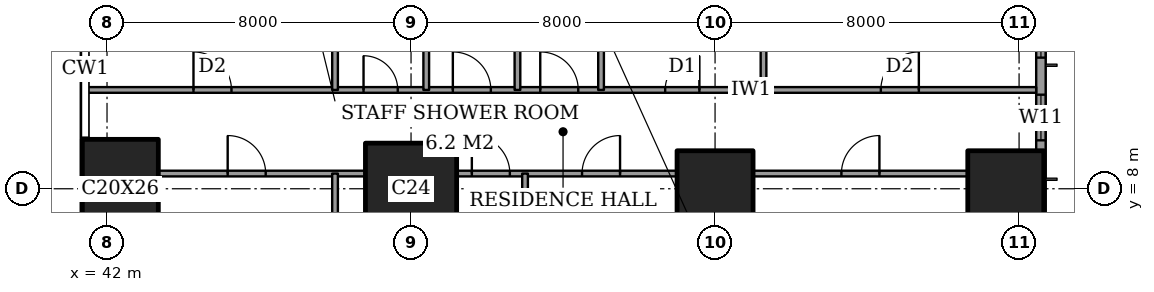
"""IFC4 building model, lengths in metres.
Left out: names, types, materials, properties, quantities, classifications, styles, units other than length and angle.
Written with IfcOpenShell. Run it as: python <this file> out.ifc"""

import sys

from ifc_helpers import new_model, si_unit, direction, frame, frame_2d, origin, origin_2d, place, context, subcontext, project, spatial, rectangle, extrude, element, fill, save


model = new_model("IFC4")
c1 = context("Model", 3, precision=1e-05, world=origin(), true_north=direction((0.0, 1.0)))
c2 = subcontext(c1, "Body", "Model", "MODEL_VIEW")
j1 = project(units=[si_unit("LENGTHUNIT", "METRE"), si_unit("PLANEANGLEUNIT", "RADIAN")], contexts=[c1])
p1 = place(None, origin())
s1 = spatial("IfcSite", under=j1, at=p1, CompositionType="ELEMENT")
p2 = place(p1, origin())
s2 = spatial("IfcBuilding", under=s1, at=p2, CompositionType="ELEMENT")
p3 = place(p2, frame((0.0, 0.0, 146.6)))
s3 = spatial("IfcBuildingStorey", under=s2, at=p3, CompositionType="ELEMENT", Elevation=146.6)
p4 = place(p3, frame((42.35, 8.0, 0.0), z_axis=(0.0, 0.0, 1.0), x_axis=(1.0, 0.0, 0.0)))
e1 = element("IfcColumn", 1, at=p4, inside=s3, PredefinedType="COLUMN", context=c2, shape_type="SweptSolid", body=[
    extrude(rectangle(XDim=2.0, YDim=2.6, at=origin_2d()), origin(), (0.0, 0.0, 1.0), 3.6),
])
p5 = place(p3, frame((50.0, 8.0, 0.0), z_axis=(0.0, 0.0, 1.0), x_axis=(1.0, 0.0, 0.0)))
e2 = element("IfcColumn", 2, at=p5, inside=s3, PredefinedType="COLUMN", context=c2, shape_type="SweptSolid", body=[
    extrude(rectangle(XDim=2.4, YDim=2.4, at=origin_2d()), origin(), (0.0, 0.0, 1.0), 3.6),
])
for number, where, z_axis, x_axis in (
    (3, (58.0, 8.0, 0.0), (0.0, 0.0, 1.0), (1.0, 0.0, 0.0)),
    (4, (65.65, 8.0, 0.0), (0.0, 0.0, 1.0), (1.0, 0.0, 0.0)),
):
    element("IfcColumn", number, at=place(p3, frame(where, z_axis=z_axis, x_axis=x_axis)), inside=s3, PredefinedType="COLUMN", context=c2, shape_type="SweptSolid", body=[
        extrude(rectangle(XDim=2.0, YDim=2.0, at=origin_2d()), origin(), (0.0, 0.0, 1.0), 3.6),
    ])
p6 = place(p3, frame((66.575, 3.175, 0.0), z_axis=(0.0, 0.0, 1.0), x_axis=(0.0, 1.0, 0.0)))
e5 = element("IfcWall", 5, at=p6, inside=s3, PredefinedType="SOLIDWALL", context=c2, shape_type="SweptSolid", body=[
    extrude(rectangle(XDim=41.65, YDim=0.25, at=frame_2d((20.825, 0.0))), origin(), (0.0, 0.0, 1.0), 3.6),
])
p7 = place(p6, frame((0.775, 0.0, 0.4)))
e6 = element("IfcOpeningElement", 6, at=p7, cuts=e5, PredefinedType="OPENING", context=c2, shape_type="SweptSolid", body=[
    extrude(rectangle(XDim=2.4, YDim=2.2, at=frame_2d((1.2, 1.1))), frame((0.0, 0.135, 0.0), z_axis=(0.0, -1.0, 0.0), x_axis=(1.0, 0.0, 0.0)), (0.0, 0.0, 1.0), 0.27),
])
p8 = place(p6, frame((6.1, 0.0, 0.4)))
e7 = element("IfcOpeningElement", 7, at=p8, cuts=e5, PredefinedType="OPENING", context=c2, shape_type="SweptSolid", body=[
    extrude(rectangle(XDim=1.2, YDim=2.2, at=frame_2d((0.6, 1.1))), frame((0.0, 0.135, 0.0), z_axis=(0.0, -1.0, 0.0), x_axis=(1.0, 0.0, 0.0)), (0.0, 0.0, 1.0), 0.27),
])
p9 = place(p6, frame((8.275, 0.0, 0.4)))
e8 = element("IfcOpeningElement", 8, at=p9, cuts=e5, PredefinedType="OPENING", context=c2, shape_type="SweptSolid", body=[
    extrude(rectangle(XDim=2.4, YDim=2.2, at=frame_2d((1.2, 1.1))), frame((0.0, 0.135, 0.0), z_axis=(0.0, -1.0, 0.0), x_axis=(1.0, 0.0, 0.0)), (0.0, 0.0, 1.0), 0.27),
])
p10 = place(p6, frame((15.775, 0.0, 0.4)))
e9 = element("IfcOpeningElement", 9, at=p10, cuts=e5, PredefinedType="OPENING", context=c2, shape_type="SweptSolid", body=[
    extrude(rectangle(XDim=2.4, YDim=2.2, at=frame_2d((1.2, 1.1))), frame((0.0, 0.135, 0.0), z_axis=(0.0, -1.0, 0.0), x_axis=(1.0, 0.0, 0.0)), (0.0, 0.0, 1.0), 0.27),
])
p11 = place(p6, frame((23.475, 0.0, 0.4)))
e10 = element("IfcOpeningElement", 10, at=p11, cuts=e5, PredefinedType="OPENING", context=c2, shape_type="SweptSolid", body=[
    extrude(rectangle(XDim=2.4, YDim=2.2, at=frame_2d((1.2, 1.1))), frame((0.0, 0.135, 0.0), z_axis=(0.0, -1.0, 0.0), x_axis=(1.0, 0.0, 0.0)), (0.0, 0.0, 1.0), 0.27),
])
p12 = place(p6, frame((30.875, 0.0, 0.4)))
e11 = element("IfcOpeningElement", 11, at=p12, cuts=e5, PredefinedType="OPENING", context=c2, shape_type="SweptSolid", body=[
    extrude(rectangle(XDim=2.4, YDim=2.2, at=frame_2d((1.2, 1.1))), frame((0.0, 0.135, 0.0), z_axis=(0.0, -1.0, 0.0), x_axis=(1.0, 0.0, 0.0)), (0.0, 0.0, 1.0), 0.27),
])
p13 = place(p6, frame((34.325, 0.0, 0.4)))
e12 = element("IfcOpeningElement", 12, at=p13, cuts=e5, PredefinedType="OPENING", context=c2, shape_type="SweptSolid", body=[
    extrude(rectangle(XDim=1.2, YDim=2.2, at=frame_2d((0.6, 1.1))), frame((0.0, 0.135, 0.0), z_axis=(0.0, -1.0, 0.0), x_axis=(1.0, 0.0, 0.0)), (0.0, 0.0, 1.0), 0.27),
])
p14 = place(p6, frame((38.475, 0.0, 0.4)))
e13 = element("IfcOpeningElement", 13, at=p14, cuts=e5, PredefinedType="OPENING", context=c2, shape_type="SweptSolid", body=[
    extrude(rectangle(XDim=2.4, YDim=2.2, at=frame_2d((1.2, 1.1))), frame((0.0, 0.135, 0.0), z_axis=(0.0, -1.0, 0.0), x_axis=(1.0, 0.0, 0.0)), (0.0, 0.0, 1.0), 0.27),
])
p15 = place(p3, frame((43.35, 8.4, 0.0), z_axis=(0.0, 0.0, 1.0), x_axis=(1.0, 0.0, 0.0)))
e14 = element("IfcWall", 14, at=p15, inside=s3, PredefinedType="PARTITIONING", context=c2, shape_type="SweptSolid", body=[
    extrude(rectangle(XDim=5.45, YDim=0.15, at=frame_2d((2.725, 0.0))), origin(), (0.0, 0.0, 1.0), 3.35),
])
p16 = place(p15, frame((1.825, 0.0, 0.0)))
e15 = element("IfcOpeningElement", 15, at=p16, cuts=e14, PredefinedType="OPENING", context=c2, shape_type="SweptSolid", body=[
    extrude(rectangle(XDim=1.0, YDim=2.1, at=frame_2d((0.5, 1.05))), frame((0.0, 0.085, 0.0), z_axis=(0.0, -1.0, 0.0), x_axis=(1.0, 0.0, 0.0)), (0.0, 0.0, 1.0), 0.17),
])
p17 = place(p3, frame((51.2, 8.4, 0.0), z_axis=(0.0, 0.0, 1.0), x_axis=(1.0, 0.0, 0.0)))
e16 = element("IfcWall", 16, at=p17, inside=s3, PredefinedType="PARTITIONING", context=c2, shape_type="SweptSolid", body=[
    extrude(rectangle(XDim=5.8, YDim=0.15, at=frame_2d((2.9, 0.0))), origin(), (0.0, 0.0, 1.0), 3.35),
])
p18 = place(p17, frame((3.3, 0.0, 0.0)))
e17 = element("IfcOpeningElement", 17, at=p18, cuts=e16, PredefinedType="OPENING", context=c2, shape_type="SweptSolid", body=[
    extrude(rectangle(XDim=1.0, YDim=2.1, at=frame_2d((0.5, 1.05))), frame((0.0, 0.085, 0.0), z_axis=(0.0, -1.0, 0.0), x_axis=(1.0, 0.0, 0.0)), (0.0, 0.0, 1.0), 0.17),
])
p19 = place(p17, frame((0.4, 0.0, 0.0)))
e18 = element("IfcOpeningElement", 18, at=p19, cuts=e16, PredefinedType="OPENING", context=c2, shape_type="SweptSolid", body=[
    extrude(rectangle(XDim=1.0, YDim=2.1, at=frame_2d((0.5, 1.05))), frame((0.0, 0.085, 0.0), z_axis=(0.0, -1.0, 0.0), x_axis=(1.0, 0.0, 0.0)), (0.0, 0.0, 1.0), 0.17),
])
p20 = place(p3, frame((59.0, 8.4, 0.0), z_axis=(0.0, 0.0, 1.0), x_axis=(1.0, 0.0, 0.0)))
e19 = element("IfcWall", 19, at=p20, inside=s3, PredefinedType="PARTITIONING", context=c2, shape_type="SweptSolid", body=[
    extrude(rectangle(XDim=5.65, YDim=0.15, at=frame_2d((2.825, 0.0))), origin(), (0.0, 0.0, 1.0), 3.35),
])
p21 = place(p20, frame((2.325, 0.0, 0.0)))
e20 = element("IfcOpeningElement", 20, at=p21, cuts=e19, PredefinedType="OPENING", context=c2, shape_type="SweptSolid", body=[
    extrude(rectangle(XDim=1.0, YDim=2.1, at=frame_2d((0.5, 1.05))), frame((0.0, 0.085, 0.0), z_axis=(0.0, -1.0, 0.0), x_axis=(1.0, 0.0, 0.0)), (0.0, 0.0, 1.0), 0.17),
])
p22 = place(p3, frame((41.439, 10.6, 0.0), z_axis=(0.0, 0.0, 1.0), x_axis=(1.0, 0.0, 0.0)))
e21 = element("IfcWall", 21, at=p22, inside=s3, PredefinedType="PARTITIONING", context=c2, shape_type="SweptSolid", body=[
    extrude(rectangle(XDim=25.011, YDim=0.15, at=frame_2d((12.505, 0.0))), origin(), (0.0, 0.0, 1.0), 3.35),
])
p23 = place(p22, frame((11.961, 0.0, 0.0)))
e22 = element("IfcOpeningElement", 22, at=p23, cuts=e21, PredefinedType="OPENING", context=c2, shape_type="SweptSolid", body=[
    extrude(rectangle(XDim=1.0, YDim=2.1, at=frame_2d((0.5, 1.05))), frame((0.0, 0.085, 0.0), z_axis=(0.0, -1.0, 0.0), x_axis=(1.0, 0.0, 0.0)), (0.0, 0.0, 1.0), 0.17),
])
p24 = place(p22, frame((20.924, 0.0, 0.0)))
e23 = element("IfcOpeningElement", 23, at=p24, cuts=e21, PredefinedType="OPENING", context=c2, shape_type="SweptSolid", body=[
    extrude(rectangle(XDim=1.0, YDim=2.1, at=frame_2d((0.5, 1.05))), frame((0.0, 0.085, 0.0), z_axis=(0.0, -1.0, 0.0), x_axis=(1.0, 0.0, 0.0)), (0.0, 0.0, 1.0), 0.17),
])
p25 = place(p22, frame((15.249, 0.0, 0.0)))
e24 = element("IfcOpeningElement", 24, at=p25, cuts=e21, PredefinedType="OPENING", context=c2, shape_type="SweptSolid", body=[
    extrude(rectangle(XDim=0.9, YDim=2.1, at=frame_2d((0.45, 1.05))), frame((0.0, 0.085, 0.0), z_axis=(0.0, -1.0, 0.0), x_axis=(1.0, 0.0, 0.0)), (0.0, 0.0, 1.0), 0.17),
])
p26 = place(p22, frame((9.661, 0.0, 0.0)))
e25 = element("IfcOpeningElement", 25, at=p26, cuts=e21, PredefinedType="OPENING", context=c2, shape_type="SweptSolid", body=[
    extrude(rectangle(XDim=1.0, YDim=2.1, at=frame_2d((0.5, 1.05))), frame((0.0, 0.085, 0.0), z_axis=(0.0, -1.0, 0.0), x_axis=(1.0, 0.0, 0.0)), (0.0, 0.0, 1.0), 0.17),
])
p27 = place(p22, frame((7.311, 0.0, 0.0)))
e26 = element("IfcOpeningElement", 26, at=p27, cuts=e21, PredefinedType="OPENING", context=c2, shape_type="SweptSolid", body=[
    extrude(rectangle(XDim=0.9, YDim=2.1, at=frame_2d((0.45, 1.05))), frame((0.0, 0.085, 0.0), z_axis=(0.0, -1.0, 0.0), x_axis=(1.0, 0.0, 0.0)), (0.0, 0.0, 1.0), 0.17),
])
p28 = place(p22, frame((2.836, 0.0, 0.0)))
e27 = element("IfcOpeningElement", 27, at=p28, cuts=e21, PredefinedType="OPENING", context=c2, shape_type="SweptSolid", body=[
    extrude(rectangle(XDim=1.0, YDim=2.1, at=frame_2d((0.5, 1.05))), frame((0.0, 0.085, 0.0), z_axis=(0.0, -1.0, 0.0), x_axis=(1.0, 0.0, 0.0)), (0.0, 0.0, 1.0), 0.17),
])
p29 = place(p3, frame((48.0, -0.45, 0.0), z_axis=(0.0, 0.0, 1.0), x_axis=(0.0, 1.0, 0.0)))
e28 = element("IfcWall", 28, at=p29, inside=s3, PredefinedType="PARTITIONING", context=c2, shape_type="SweptSolid", body=[
    extrude(rectangle(XDim=8.85, YDim=0.15, at=frame_2d((4.425, 0.0))), origin(), (0.0, 0.0, 1.0), 3.35),
])
p30 = place(p3, frame((48.0, 10.6, 0.0), z_axis=(0.0, 0.0, 1.0), x_axis=(0.0, 1.0, 0.0)))
e29 = element("IfcWall", 29, at=p30, inside=s3, PredefinedType="PARTITIONING", context=c2, shape_type="SweptSolid", body=[
    extrude(rectangle(XDim=8.4, YDim=0.15, at=frame_2d((4.2, 0.0))), origin(), (0.0, 0.0, 1.0), 3.35),
])
p31 = place(p30, frame((6.7, 0.0, 0.0)))
e30 = element("IfcOpeningElement", 30, at=p31, cuts=e29, PredefinedType="OPENING", context=c2, shape_type="SweptSolid", body=[
    extrude(rectangle(XDim=0.9, YDim=2.1, at=frame_2d((0.45, 1.05))), frame((0.0, 0.085, 0.0), z_axis=(0.0, -1.0, 0.0), x_axis=(1.0, 0.0, 0.0)), (0.0, 0.0, 1.0), 0.17),
])
p32 = place(p3, frame((50.4, 10.6, 0.0), z_axis=(0.0, 0.0, 1.0), x_axis=(0.0, 1.0, 0.0)))
e31 = element("IfcWall", 31, at=p32, inside=s3, PredefinedType="PARTITIONING", context=c2, shape_type="SweptSolid", body=[
    extrude(rectangle(XDim=4.2, YDim=0.15, at=frame_2d((2.1, 0.0))), origin(), (0.0, 0.0, 1.0), 3.35),
])
p33 = place(p3, frame((52.8, 10.6, 0.0), z_axis=(0.0, 0.0, 1.0), x_axis=(0.0, 1.0, 0.0)))
e32 = element("IfcWall", 32, at=p33, inside=s3, PredefinedType="PARTITIONING", context=c2, shape_type="SweptSolid", body=[
    extrude(rectangle(XDim=8.4, YDim=0.15, at=frame_2d((4.2, 0.0))), origin(), (0.0, 0.0, 1.0), 3.35),
])
p34 = place(p3, frame((53.0, -0.45, 0.0), z_axis=(0.0, 0.0, 1.0), x_axis=(0.0, 1.0, 0.0)))
e33 = element("IfcWall", 33, at=p34, inside=s3, PredefinedType="PARTITIONING", context=c2, shape_type="SweptSolid", body=[
    extrude(rectangle(XDim=8.85, YDim=0.15, at=frame_2d((4.425, 0.0))), origin(), (0.0, 0.0, 1.0), 3.35),
])
p35 = place(p3, frame((55.0, 10.6, 0.0), z_axis=(0.0, 0.0, 1.0), x_axis=(0.0, 1.0, 0.0)))
e34 = element("IfcWall", 34, at=p35, inside=s3, PredefinedType="PARTITIONING", context=c2, shape_type="SweptSolid", body=[
    extrude(rectangle(XDim=11.0, YDim=0.15, at=frame_2d((5.5, 0.0))), origin(), (0.0, 0.0, 1.0), 3.35),
])
p36 = place(p35, frame((9.2, 0.0, 0.0)))
e35 = element("IfcOpeningElement", 35, at=p36, cuts=e34, PredefinedType="OPENING", context=c2, shape_type="SweptSolid", body=[
    extrude(rectangle(XDim=1.0, YDim=2.1, at=frame_2d((0.5, 1.05))), frame((0.0, 0.085, 0.0), z_axis=(0.0, -1.0, 0.0), x_axis=(1.0, 0.0, 0.0)), (0.0, 0.0, 1.0), 0.17),
])
p37 = place(p3, frame((59.275, 10.6, 0.0), z_axis=(0.0, 0.0, 1.0), x_axis=(0.0, 1.0, 0.0)))
e36 = element("IfcWall", 36, at=p37, inside=s3, PredefinedType="PARTITIONING", context=c2, shape_type="SweptSolid", body=[
    extrude(rectangle(XDim=4.2, YDim=0.15, at=frame_2d((2.1, 0.0))), origin(), (0.0, 0.0, 1.0), 3.35),
])
p38 = place(p8, origin())
e37 = element("IfcWindow", 37, at=p38, inside=s3, PartitioningType="SINGLE_PANEL", PredefinedType="WINDOW", context=c2, shape_type="SweptSolid", body=[
    extrude(rectangle(XDim=1.2, YDim=2.2, at=frame_2d((0.6, 1.1))), frame((0.0, 0.03, 0.0), z_axis=(0.0, -1.0, 0.0), x_axis=(1.0, 0.0, 0.0)), (0.0, 0.0, 1.0), 0.06),
])
fill(e7, e37)
p39 = place(p9, origin())
e38 = element("IfcWindow", 38, at=p39, inside=s3, PartitioningType="SINGLE_PANEL", PredefinedType="WINDOW", context=c2, shape_type="SweptSolid", body=[
    extrude(rectangle(XDim=2.4, YDim=2.2, at=frame_2d((1.2, 1.1))), frame((0.0, 0.03, 0.0), z_axis=(0.0, -1.0, 0.0), x_axis=(1.0, 0.0, 0.0)), (0.0, 0.0, 1.0), 0.06),
])
fill(e8, e38)
p40 = place(p21, origin())
e39 = element("IfcDoor", 39, at=p40, inside=s3, OperationType="SINGLE_SWING_LEFT", PredefinedType="DOOR", context=c2, shape_type="SweptSolid", body=[
    extrude(rectangle(XDim=1.0, YDim=2.1, at=frame_2d((0.5, 1.05))), frame((0.0, 0.025, 0.0), z_axis=(0.0, -1.0, 0.0), x_axis=(1.0, 0.0, 0.0)), (0.0, 0.0, 1.0), 0.05),
])
fill(e20, e39)
p41 = place(p18, origin())
e40 = element("IfcDoor", 40, at=p41, inside=s3, OperationType="SINGLE_SWING_LEFT", PredefinedType="DOOR", context=c2, shape_type="SweptSolid", body=[
    extrude(rectangle(XDim=1.0, YDim=2.1, at=frame_2d((0.5, 1.05))), frame((0.0, 0.025, 0.0), z_axis=(0.0, -1.0, 0.0), x_axis=(1.0, 0.0, 0.0)), (0.0, 0.0, 1.0), 0.05),
])
fill(e17, e40)
p42 = place(p19, origin())
e41 = element("IfcDoor", 41, at=p42, inside=s3, OperationType="SINGLE_SWING_RIGHT", PredefinedType="DOOR", context=c2, shape_type="SweptSolid", body=[
    extrude(rectangle(XDim=1.0, YDim=2.1, at=frame_2d((0.5, 1.05))), frame((0.0, 0.025, 0.0), z_axis=(0.0, -1.0, 0.0), x_axis=(1.0, 0.0, 0.0)), (0.0, 0.0, 1.0), 0.05),
])
fill(e18, e41)
p43 = place(p16, origin())
e42 = element("IfcDoor", 42, at=p43, inside=s3, OperationType="SINGLE_SWING_RIGHT", PredefinedType="DOOR", context=c2, shape_type="SweptSolid", body=[
    extrude(rectangle(XDim=1.0, YDim=2.1, at=frame_2d((0.5, 1.05))), frame((0.0, 0.025, 0.0), z_axis=(0.0, -1.0, 0.0), x_axis=(1.0, 0.0, 0.0)), (0.0, 0.0, 1.0), 0.05),
])
fill(e15, e42)
p44 = place(p23, origin())
e43 = element("IfcDoor", 43, at=p44, inside=s3, OperationType="SINGLE_SWING_RIGHT", PredefinedType="DOOR", context=c2, shape_type="SweptSolid", body=[
    extrude(rectangle(XDim=1.0, YDim=2.1, at=frame_2d((0.5, 1.05))), frame((0.0, 0.025, 0.0), z_axis=(0.0, -1.0, 0.0), x_axis=(1.0, 0.0, 0.0)), (0.0, 0.0, 1.0), 0.05),
])
fill(e22, e43)
p45 = place(p24, origin())
e44 = element("IfcDoor", 44, at=p45, inside=s3, OperationType="SINGLE_SWING_LEFT", PredefinedType="DOOR", context=c2, shape_type="SweptSolid", body=[
    extrude(rectangle(XDim=1.0, YDim=2.1, at=frame_2d((0.5, 1.05))), frame((0.0, 0.025, 0.0), z_axis=(0.0, -1.0, 0.0), x_axis=(1.0, 0.0, 0.0)), (0.0, 0.0, 1.0), 0.05),
])
fill(e23, e44)
p46 = place(p25, origin())
e45 = element("IfcDoor", 45, at=p46, inside=s3, OperationType="SINGLE_SWING_LEFT", PredefinedType="DOOR", context=c2, shape_type="SweptSolid", body=[
    extrude(rectangle(XDim=0.9, YDim=2.1, at=frame_2d((0.45, 1.05))), frame((0.0, 0.025, 0.0), z_axis=(0.0, -1.0, 0.0), x_axis=(1.0, 0.0, 0.0)), (0.0, 0.0, 1.0), 0.05),
])
fill(e24, e45)
p47 = place(p26, origin())
e46 = element("IfcDoor", 46, at=p47, inside=s3, OperationType="SINGLE_SWING_RIGHT", PredefinedType="DOOR", context=c2, shape_type="SweptSolid", body=[
    extrude(rectangle(XDim=1.0, YDim=2.1, at=frame_2d((0.5, 1.05))), frame((0.0, 0.025, 0.0), z_axis=(0.0, -1.0, 0.0), x_axis=(1.0, 0.0, 0.0)), (0.0, 0.0, 1.0), 0.05),
])
fill(e25, e46)
p48 = place(p27, origin())
e47 = element("IfcDoor", 47, at=p48, inside=s3, OperationType="SINGLE_SWING_RIGHT", PredefinedType="DOOR", context=c2, shape_type="SweptSolid", body=[
    extrude(rectangle(XDim=0.9, YDim=2.1, at=frame_2d((0.45, 1.05))), frame((0.0, 0.025, 0.0), z_axis=(0.0, -1.0, 0.0), x_axis=(1.0, 0.0, 0.0)), (0.0, 0.0, 1.0), 0.05),
])
fill(e26, e47)
p49 = place(p28, origin())
e48 = element("IfcDoor", 48, at=p49, inside=s3, OperationType="SINGLE_SWING_RIGHT", PredefinedType="DOOR", context=c2, shape_type="SweptSolid", body=[
    extrude(rectangle(XDim=1.0, YDim=2.1, at=frame_2d((0.5, 1.05))), frame((0.0, 0.025, 0.0), z_axis=(0.0, -1.0, 0.0), x_axis=(1.0, 0.0, 0.0)), (0.0, 0.0, 1.0), 0.05),
])
fill(e27, e48)
save(model, sys.argv[1])
